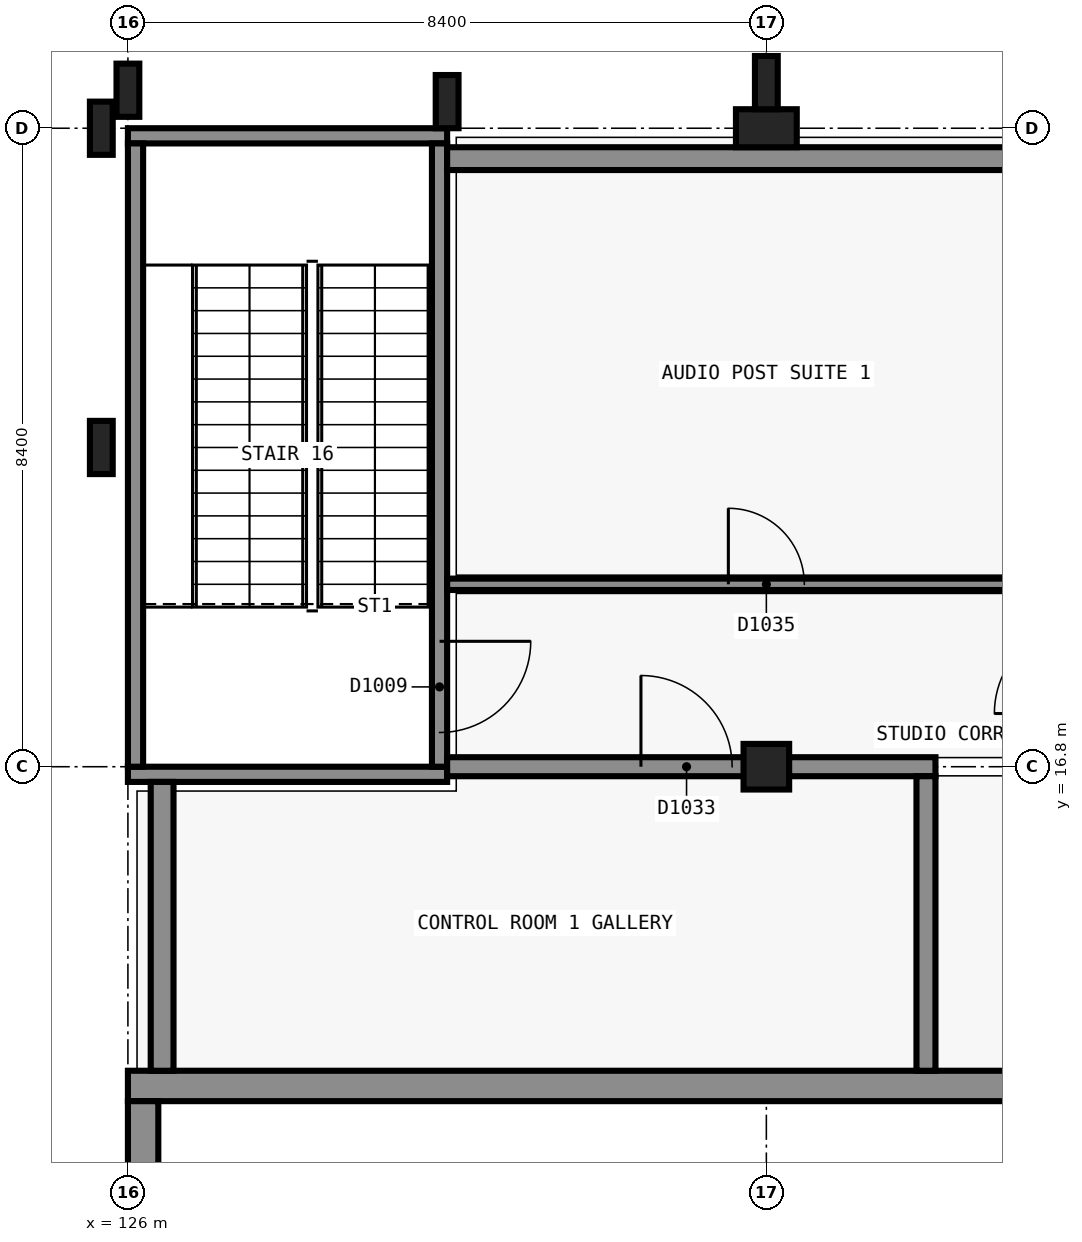
"""IFC4 building model, lengths in metres.
Left out: names, types, materials, properties, quantities, classifications, styles, units other than length and angle.
Written with IfcOpenShell. Run it as: python <this file> out.ifc"""

import sys

from ifc_helpers import new_model, si_unit, direction, frame, frame_2d, origin, origin_2d, place, context, subcontext, project, spatial, rectangle, extrude, element, fill, save


model = new_model("IFC4")
c1 = context("Model", 3, precision=1e-05, world=origin(), true_north=direction((0.0, 1.0)))
c2 = subcontext(c1, "Body", "Model", "MODEL_VIEW")
j1 = project(units=[si_unit("LENGTHUNIT", "METRE"), si_unit("PLANEANGLEUNIT", "RADIAN")], contexts=[c1])
p1 = place(None, origin())
s1 = spatial("IfcSite", under=j1, at=p1, CompositionType="ELEMENT")
p2 = place(p1, origin())
s2 = spatial("IfcBuilding", under=s1, at=p2, CompositionType="ELEMENT")
p3 = place(p2, frame((0.0, 0.0, 5.4)))
s3 = spatial("IfcBuildingStorey", under=s2, at=p3, CompositionType="ELEMENT", Elevation=5.4)
for number, where, z_axis, x_axis in (
    (1, (130.2, 16.7, 0.0), (0.0, 0.0, 1.0), (-1.0, 0.0, 0.0)),
    (2, (126.0, 25.1, 0.0), (0.0, 0.0, 1.0), (1.0, 0.0, 0.0)),
):
    element("IfcWall", number, at=place(p3, frame(where, z_axis=z_axis, x_axis=x_axis)), inside=s3, PredefinedType="SHEAR", context=c2, shape_type="SweptSolid", body=[
        extrude(rectangle(XDim=4.2, YDim=0.2, at=frame_2d((2.1, 0.0))), origin(), (0.0, 0.0, 1.0), 4.8),
    ])
p4 = place(p3, frame((126.1, 16.8, 0.0), z_axis=(0.0, 0.0, 1.0), x_axis=(0.0, 1.0, 0.0)))
e3 = element("IfcWall", 3, at=p4, inside=s3, PredefinedType="SHEAR", context=c2, shape_type="SweptSolid", body=[
    extrude(rectangle(XDim=8.2, YDim=0.2, at=frame_2d((4.1, 0.0))), origin(), (0.0, 0.0, 1.0), 4.8),
])
p5 = place(p3, frame((130.1, 25.0, 0.0), z_axis=(0.0, 0.0, 1.0), x_axis=(0.0, -1.0, 0.0)))
e4 = element("IfcWall", 4, at=p5, inside=s3, PredefinedType="SHEAR", context=c2, shape_type="SweptSolid", body=[
    extrude(rectangle(XDim=8.2, YDim=0.2, at=frame_2d((4.1, 0.0))), origin(), (0.0, 0.0, 1.0), 4.8),
])
p6 = place(p5, frame((6.55, 0.0, 0.0)))
e5 = element("IfcOpeningElement", 5, at=p6, cuts=e4, PredefinedType="OPENING", context=c2, shape_type="SweptSolid", body=[
    extrude(rectangle(XDim=1.2, YDim=2.1, at=frame_2d((0.6, 1.05))), frame((0.0, 0.11, 0.0), z_axis=(0.0, -1.0, 0.0), x_axis=(1.0, 0.0, 0.0)), (0.0, 0.0, 1.0), 0.22),
])
p7 = place(p3, frame((126.0, 12.6, 0.0), z_axis=(0.0, 0.0, 1.0), x_axis=(1.0, 0.0, 0.0)))
e6 = element("IfcWall", 6, at=p7, inside=s3, PredefinedType="SHEAR", context=c2, shape_type="SweptSolid", body=[
    extrude(rectangle(XDim=17.0, YDim=0.4, at=frame_2d((8.5, 0.0))), origin(), (0.0, 0.0, 1.0), 4.8),
])
p8 = place(p3, frame((126.2, 0.4, 0.0), z_axis=(0.0, 0.0, 1.0), x_axis=(0.0, 1.0, 0.0)))
e7 = element("IfcWall", 7, at=p8, inside=s3, PredefinedType="SHEAR", context=c2, shape_type="SweptSolid", body=[
    extrude(rectangle(XDim=12.0, YDim=0.4, at=frame_2d((6.0, 0.0))), origin(), (0.0, 0.0, 1.0), 4.8),
])
p9 = place(p3, frame((134.4, 16.8, 0.0), z_axis=(0.0, 0.0, 1.0), x_axis=(1.0, 0.0, 0.0)))
e8 = element("IfcColumn", 8, at=p9, inside=s3, PredefinedType="COLUMN", context=c2, shape_type="SweptSolid", body=[
    extrude(rectangle(XDim=0.6, YDim=0.6, at=origin_2d()), origin(), (0.0, 0.0, 1.0), 4.8),
])
p10 = place(p3, frame((134.4, 25.2, 0.0), z_axis=(0.0, 0.0, 1.0), x_axis=(1.0, 0.0, 0.0)))
e9 = element("IfcColumn", 9, at=p10, inside=s3, PredefinedType="COLUMN", context=c2, shape_type="SweptSolid", body=[
    extrude(rectangle(XDim=0.8, YDim=0.5, at=origin_2d()), origin(), (0.0, 0.0, 1.0), 4.8),
])
p11 = place(p3, frame((130.2, 24.8, 0.0), z_axis=(0.0, 0.0, 1.0), x_axis=(1.0, 0.0, 0.0)))
e10 = element("IfcWall", 10, at=p11, inside=s3, PredefinedType="SOLIDWALL", context=c2, shape_type="SweptSolid", body=[
    extrude(rectangle(XDim=8.4, YDim=0.3, at=frame_2d((4.2, 0.0))), origin(), (0.0, 0.0, 1.0), 4.5),
])
for number, where, z_axis, x_axis in (
    (11, (126.0, 25.7, 0.0), (0.0, 0.0, 1.0), (1.0, 0.0, 0.0)),
    (12, (130.2, 25.55, 0.0), (0.0, 0.0, 1.0), (1.0, 0.0, 0.0)),
    (13, (134.4, 25.8, 0.0), (0.0, 0.0, 1.0), (1.0, 0.0, 0.0)),
):
    element("IfcColumn", number, at=place(p3, frame(where, z_axis=z_axis, x_axis=x_axis)), inside=s3, PredefinedType="PILASTER", context=c2, shape_type="SweptSolid", body=[
        extrude(rectangle(XDim=0.3, YDim=0.7, at=origin_2d()), origin(), (0.0, 0.0, 1.0), 4.8),
    ])
p12 = place(p3, frame((126.45, 12.8, 0.0), z_axis=(0.0, 0.0, 1.0), x_axis=(0.0, 1.0, 0.0)))
e14 = element("IfcWall", 14, at=p12, inside=s3, PredefinedType="SOLIDWALL", context=c2, shape_type="SweptSolid", body=[
    extrude(rectangle(XDim=3.8, YDim=0.3, at=frame_2d((1.9, 0.0))), origin(), (0.0, 0.0, 1.0), 4.5),
])
for number, where, z_axis, x_axis in (
    (15, (125.65, 21.0, 0.0), (0.0, 0.0, 1.0), (0.0, 1.0, 0.0)),
    (16, (125.65, 25.2, 0.0), (0.0, 0.0, 1.0), (0.0, 1.0, 0.0)),
):
    element("IfcColumn", number, at=place(p3, frame(where, z_axis=z_axis, x_axis=x_axis)), inside=s3, PredefinedType="PILASTER", context=c2, shape_type="SweptSolid", body=[
        extrude(rectangle(XDim=0.3, YDim=0.7, at=origin_2d()), origin(), (0.0, 0.0, 1.0), 4.8),
    ])
p13 = place(p3, frame((130.2, 16.8, 0.0), z_axis=(0.0, 0.0, 1.0), x_axis=(1.0, 0.0, 0.0)))
e17 = element("IfcWall", 17, at=p13, inside=s3, PredefinedType="PARTITIONING", context=c2, shape_type="SweptSolid", body=[
    extrude(rectangle(XDim=6.425, YDim=0.25, at=frame_2d((3.212, 0.0))), origin(), (0.0, 0.0, 1.0), 3.8),
])
p14 = place(p13, frame((2.55, 0.0, 0.0)))
e18 = element("IfcOpeningElement", 18, at=p14, cuts=e17, PredefinedType="OPENING", context=c2, shape_type="SweptSolid", body=[
    extrude(rectangle(XDim=1.2, YDim=2.1, at=frame_2d((0.6, 1.05))), frame((0.0, 0.135, 0.0), z_axis=(0.0, -1.0, 0.0), x_axis=(1.0, 0.0, 0.0)), (0.0, 0.0, 1.0), 0.27),
])
p15 = place(p3, frame((136.5, 12.8, 0.0), z_axis=(0.0, 0.0, 1.0), x_axis=(0.0, 1.0, 0.0)))
e19 = element("IfcWall", 19, at=p15, inside=s3, PredefinedType="PARTITIONING", context=c2, shape_type="SweptSolid", body=[
    extrude(rectangle(XDim=3.875, YDim=0.25, at=frame_2d((1.938, 0.0))), origin(), (0.0, 0.0, 1.0), 3.8),
])
p16 = place(p3, frame((130.2, 19.2, 0.0), z_axis=(0.0, 0.0, 1.0), x_axis=(1.0, 0.0, 0.0)))
e20 = element("IfcWall", 20, at=p16, inside=s3, PredefinedType="PARTITIONING", context=c2, shape_type="SweptSolid", body=[
    extrude(rectangle(XDim=8.475, YDim=0.15, at=frame_2d((4.237, 0.0))), origin(), (0.0, 0.0, 1.0), 3.8),
])
p17 = place(p16, frame((3.7, 0.0, 0.0)))
e21 = element("IfcOpeningElement", 21, at=p17, cuts=e20, PredefinedType="OPENING", context=c2, shape_type="SweptSolid", body=[
    extrude(rectangle(XDim=1.0, YDim=2.1, at=frame_2d((0.5, 1.05))), frame((0.0, 0.085, 0.0), z_axis=(0.0, -1.0, 0.0), x_axis=(1.0, 0.0, 0.0)), (0.0, 0.0, 1.0), 0.17),
])
p18 = place(p6, origin())
e22 = element("IfcDoor", 22, at=p18, inside=s3, OperationType="SINGLE_SWING_LEFT", PredefinedType="DOOR", context=c2, shape_type="SweptSolid", body=[
    extrude(rectangle(XDim=1.2, YDim=2.1, at=frame_2d((0.6, 1.05))), frame((0.0, 0.025, 0.0), z_axis=(0.0, -1.0, 0.0), x_axis=(1.0, 0.0, 0.0)), (0.0, 0.0, 1.0), 0.05),
])
fill(e5, e22)
p19 = place(p14, origin())
e23 = element("IfcDoor", 23, at=p19, inside=s3, OperationType="SINGLE_SWING_RIGHT", PredefinedType="DOOR", context=c2, shape_type="SweptSolid", body=[
    extrude(rectangle(XDim=1.2, YDim=2.1, at=frame_2d((0.6, 1.05))), frame((0.0, 0.025, 0.0), z_axis=(0.0, -1.0, 0.0), x_axis=(1.0, 0.0, 0.0)), (0.0, 0.0, 1.0), 0.05),
])
fill(e18, e23)
p20 = place(p17, origin())
e24 = element("IfcDoor", 24, at=p20, inside=s3, OperationType="SINGLE_SWING_LEFT", PredefinedType="DOOR", context=c2, shape_type="SweptSolid", body=[
    extrude(rectangle(XDim=1.0, YDim=2.1, at=frame_2d((0.5, 1.05))), frame((0.0, 0.025, 0.0), z_axis=(0.0, -1.0, 0.0), x_axis=(1.0, 0.0, 0.0)), (0.0, 0.0, 1.0), 0.05),
])
fill(e21, e24)
save(model, sys.argv[1])
